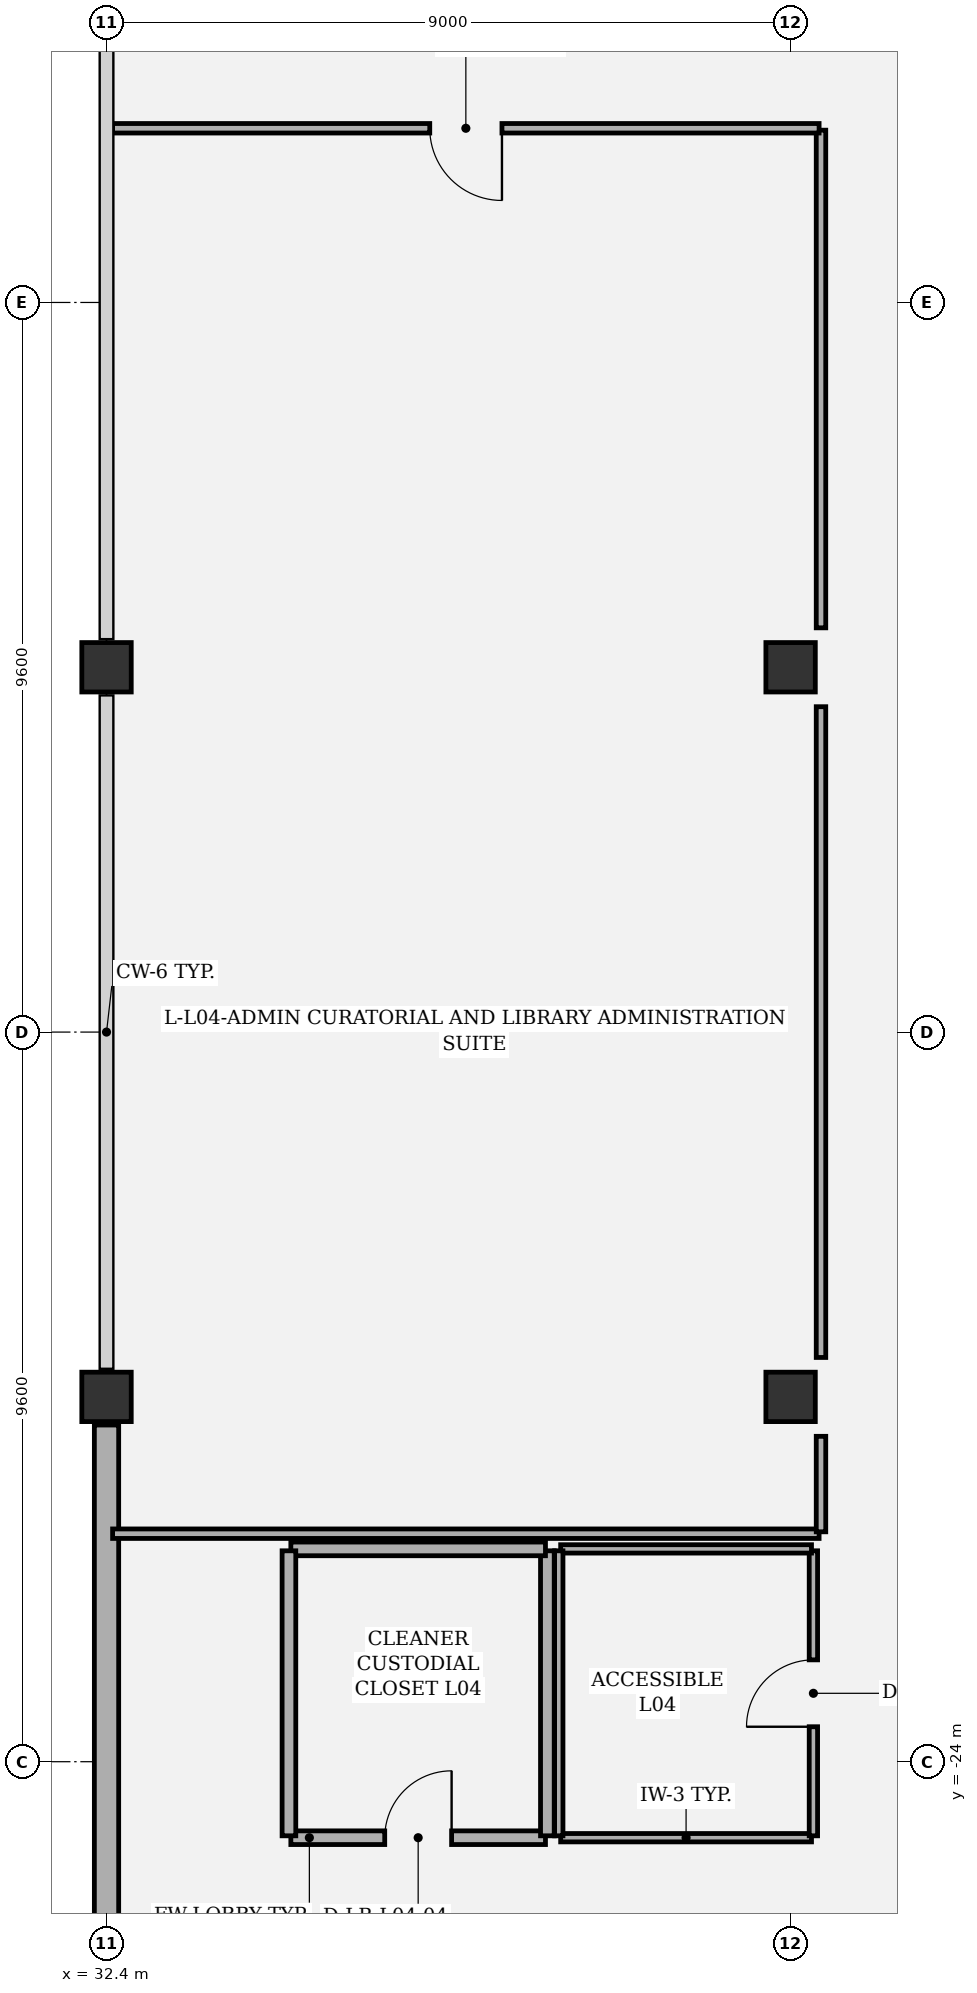
"""IFC4 building model, lengths in metres.
Left out: names, types, materials, properties, quantities, classifications, styles, units other than length and angle.
Written with IfcOpenShell. Run it as: python <this file> out.ifc"""

import sys

from ifc_helpers import new_model, si_unit, direction, frame, frame_2d, origin, origin_2d, place, context, subcontext, project, spatial, rectangle, extrude, element, fill, save


model = new_model("IFC4")
c1 = context("Model", 3, precision=1e-05, world=origin(), true_north=direction((0.0, 1.0)))
c2 = subcontext(c1, "Body", "Model", "MODEL_VIEW")
j1 = project(units=[si_unit("LENGTHUNIT", "METRE"), si_unit("PLANEANGLEUNIT", "RADIAN")], contexts=[c1])
p1 = place(None, origin())
s1 = spatial("IfcSite", under=j1, at=p1, CompositionType="ELEMENT")
p2 = place(p1, origin())
s2 = spatial("IfcBuilding", under=s1, at=p2, CompositionType="ELEMENT")
p3 = place(p2, frame((0.0, 0.0, 22.0)))
s3 = spatial("IfcBuildingStorey", under=s2, at=p3, CompositionType="ELEMENT", Elevation=22.0)
p4 = place(p3, frame((32.4, -19.2, 0.0), z_axis=(0.0, 0.0, 1.0), x_axis=(1.0, 0.0, 0.0)))
e1 = element("IfcColumn", 1, at=p4, inside=s3, PredefinedType="COLUMN", context=c2, shape_type="SweptSolid", body=[
    extrude(rectangle(XDim=0.65, YDim=0.65, at=origin_2d()), origin(), (0.0, 0.0, 1.0), 5.0),
])
p5 = place(p3, frame((32.4, -9.6, 0.0), z_axis=(0.0, 0.0, 1.0), x_axis=(1.0, 0.0, 0.0)))
e2 = element("IfcColumn", 2, at=p5, inside=s3, PredefinedType="COLUMN", context=c2, shape_type="SweptSolid", body=[
    extrude(rectangle(XDim=0.65, YDim=0.65, at=origin_2d()), origin(), (0.0, 0.0, 1.0), 7.094),
])
p6 = place(p3, frame((41.4, -19.2, 0.0), z_axis=(0.0, 0.0, 1.0), x_axis=(1.0, 0.0, 0.0)))
e3 = element("IfcColumn", 3, at=p6, inside=s3, PredefinedType="COLUMN", context=c2, shape_type="SweptSolid", body=[
    extrude(rectangle(XDim=0.65, YDim=0.65, at=origin_2d()), origin(), (0.0, 0.0, 1.0), 5.0),
])
p7 = place(p3, frame((41.4, -9.6, 0.0), z_axis=(0.0, 0.0, 1.0), x_axis=(1.0, 0.0, 0.0)))
e4 = element("IfcColumn", 4, at=p7, inside=s3, PredefinedType="COLUMN", context=c2, shape_type="SweptSolid", body=[
    extrude(rectangle(XDim=0.65, YDim=0.65, at=origin_2d()), origin(), (0.0, 0.0, 1.0), 7.094),
])
p8 = place(p3, frame((32.4, -28.43, 0.0), z_axis=(0.0, 0.0, 1.0), x_axis=(0.0, 1.0, 0.0)))
e5 = element("IfcWall", 5, at=p8, inside=s3, PredefinedType="SOLIDWALL", context=c2, shape_type="SweptSolid", body=[
    extrude(rectangle(XDim=8.86, YDim=0.32, at=frame_2d((4.43, 0.0))), origin(), (0.0, 0.0, 1.0), 4.7),
])
p9 = place(p3, frame((38.375, -25.0, 0.0), z_axis=(0.0, 0.0, 1.0), x_axis=(1.0, 0.0, 0.0)))
e6 = element("IfcWall", 6, at=p9, inside=s3, PredefinedType="PARTITIONING", context=c2, shape_type="SweptSolid", body=[
    extrude(rectangle(XDim=3.3, YDim=0.11, at=frame_2d((1.65, 0.0))), origin(), (0.0, 0.0, 1.0), 4.7),
])
p10 = place(p3, frame((41.7, -24.975, 0.0), z_axis=(0.0, 0.0, 1.0), x_axis=(0.0, 1.0, 0.0)))
e7 = element("IfcWall", 7, at=p10, inside=s3, PredefinedType="PARTITIONING", context=c2, shape_type="SweptSolid", body=[
    extrude(rectangle(XDim=3.75, YDim=0.11, at=frame_2d((1.875, 0.0))), origin(), (0.0, 0.0, 1.0), 4.7),
])
p11 = place(p10, frame((1.435, 0.0, 0.0)))
e8 = element("IfcOpeningElement", 8, at=p11, cuts=e7, PredefinedType="OPENING", context=c2, shape_type="SweptSolid", body=[
    extrude(rectangle(XDim=0.88, YDim=2.1, at=frame_2d((0.44, 1.05))), frame((0.0, 0.065, 0.0), z_axis=(0.0, -1.0, 0.0), x_axis=(1.0, 0.0, 0.0)), (0.0, 0.0, 1.0), 0.13),
])
p12 = place(p3, frame((41.675, -21.2, 0.0), z_axis=(0.0, 0.0, 1.0), x_axis=(-1.0, 0.0, 0.0)))
e9 = element("IfcWall", 9, at=p12, inside=s3, PredefinedType="PARTITIONING", context=c2, shape_type="SweptSolid", body=[
    extrude(rectangle(XDim=3.3, YDim=0.11, at=frame_2d((1.65, 0.0))), origin(), (0.0, 0.0, 1.0), 4.7),
])
p13 = place(p3, frame((38.35, -21.225, 0.0), z_axis=(0.0, 0.0, 1.0), x_axis=(0.0, -1.0, 0.0)))
e10 = element("IfcWall", 10, at=p13, inside=s3, PredefinedType="PARTITIONING", context=c2, shape_type="SweptSolid", body=[
    extrude(rectangle(XDim=3.75, YDim=0.11, at=frame_2d((1.875, 0.0))), origin(), (0.0, 0.0, 1.0), 4.7),
])
p14 = place(p3, frame((34.825, -25.0, 0.0), z_axis=(0.0, 0.0, 1.0), x_axis=(1.0, 0.0, 0.0)))
e11 = element("IfcWall", 11, at=p14, inside=s3, PredefinedType="PARTITIONING", context=c2, shape_type="SweptSolid", body=[
    extrude(rectangle(XDim=3.35, YDim=0.18, at=frame_2d((1.675, 0.0))), origin(), (0.0, 0.0, 1.0), 4.7),
])
p15 = place(p14, frame((1.235, 0.0, 0.0)))
e12 = element("IfcOpeningElement", 12, at=p15, cuts=e11, PredefinedType="OPENING", context=c2, shape_type="SweptSolid", body=[
    extrude(rectangle(XDim=0.88, YDim=2.1, at=frame_2d((0.44, 1.05))), frame((0.0, 0.1, 0.0), z_axis=(0.0, -1.0, 0.0), x_axis=(1.0, 0.0, 0.0)), (0.0, 0.0, 1.0), 0.2),
])
p16 = place(p3, frame((38.2, -24.975, 0.0), z_axis=(0.0, 0.0, 1.0), x_axis=(0.0, 1.0, 0.0)))
e13 = element("IfcWall", 13, at=p16, inside=s3, PredefinedType="PARTITIONING", context=c2, shape_type="SweptSolid", body=[
    extrude(rectangle(XDim=3.75, YDim=0.18, at=frame_2d((1.875, 0.0))), origin(), (0.0, 0.0, 1.0), 4.7),
])
p17 = place(p3, frame((38.175, -21.2, 0.0), z_axis=(0.0, 0.0, 1.0), x_axis=(-1.0, 0.0, 0.0)))
e14 = element("IfcWall", 14, at=p17, inside=s3, PredefinedType="PARTITIONING", context=c2, shape_type="SweptSolid", body=[
    extrude(rectangle(XDim=3.35, YDim=0.18, at=frame_2d((1.675, 0.0))), origin(), (0.0, 0.0, 1.0), 4.7),
])
p18 = place(p3, frame((34.8, -21.225, 0.0), z_axis=(0.0, 0.0, 1.0), x_axis=(0.0, -1.0, 0.0)))
e15 = element("IfcWall", 15, at=p18, inside=s3, PredefinedType="PARTITIONING", context=c2, shape_type="SweptSolid", body=[
    extrude(rectangle(XDim=3.75, YDim=0.18, at=frame_2d((1.875, 0.0))), origin(), (0.0, 0.0, 1.0), 4.7),
])
p19 = place(p3, frame((32.48, -21.0, 0.0), z_axis=(0.0, 0.0, 1.0), x_axis=(1.0, 0.0, 0.0)))
e16 = element("IfcWall", 16, at=p19, inside=s3, PredefinedType="PARTITIONING", context=c2, shape_type="SweptSolid", body=[
    extrude(rectangle(XDim=9.295, YDim=0.125, at=frame_2d((4.647, 0.0))), origin(), (0.0, 0.0, 1.0), 4.7),
])
p20 = place(p3, frame((41.8, -20.975, 0.0), z_axis=(0.0, 0.0, 1.0), x_axis=(0.0, 1.0, 0.0)))
e17 = element("IfcWall", 17, at=p20, inside=s3, PredefinedType="PARTITIONING", context=c2, shape_type="SweptSolid", body=[
    extrude(rectangle(XDim=1.256, YDim=0.125, at=frame_2d((0.628, 0.0))), origin(), (0.0, 0.0, 1.0), 4.7),
])
p21 = place(p3, frame((41.8, -18.681, 0.0), z_axis=(0.0, 0.0, 1.0), x_axis=(0.0, 1.0, 0.0)))
e18 = element("IfcWall", 18, at=p21, inside=s3, PredefinedType="PARTITIONING", context=c2, shape_type="SweptSolid", body=[
    extrude(rectangle(XDim=8.562, YDim=0.125, at=frame_2d((4.281, 0.0))), origin(), (0.0, 0.0, 1.0), 4.7),
])
p22 = place(p3, frame((41.8, -9.081, 0.0), z_axis=(0.0, 0.0, 1.0), x_axis=(0.0, 1.0, 0.0)))
e19 = element("IfcWall", 19, at=p22, inside=s3, PredefinedType="PARTITIONING", context=c2, shape_type="SweptSolid", body=[
    extrude(rectangle(XDim=6.548, YDim=0.125, at=frame_2d((3.274, 0.0))), origin(), (0.0, 0.0, 1.0), 4.7),
])
p23 = place(p3, frame((41.775, -2.508, 0.0), z_axis=(0.0, 0.0, 1.0), x_axis=(-1.0, 0.0, 0.0)))
e20 = element("IfcWall", 20, at=p23, inside=s3, PredefinedType="PARTITIONING", context=c2, shape_type="SweptSolid", body=[
    extrude(rectangle(XDim=9.295, YDim=0.125, at=frame_2d((4.647, 0.0))), origin(), (0.0, 0.0, 1.0), 4.7),
])
p24 = place(p23, frame((4.172, 0.0, 0.0)))
e21 = element("IfcOpeningElement", 21, at=p24, cuts=e20, PredefinedType="OPENING", context=c2, shape_type="SweptSolid", body=[
    extrude(rectangle(XDim=0.95, YDim=2.15, at=frame_2d((0.475, 1.075))), frame((0.0, 0.073, 0.0), z_axis=(0.0, -1.0, 0.0), x_axis=(1.0, 0.0, 0.0)), (0.0, 0.0, 1.0), 0.145),
])
p25 = place(p11, origin())
e22 = element("IfcDoor", 22, at=p25, inside=s3, OperationType="SINGLE_SWING_LEFT", PredefinedType="DOOR", context=c2, shape_type="SweptSolid", body=[
    extrude(rectangle(XDim=0.88, YDim=2.1, at=frame_2d((0.44, 1.05))), frame((0.0, 0.025, 0.0), z_axis=(0.0, -1.0, 0.0), x_axis=(1.0, 0.0, 0.0)), (0.0, 0.0, 1.0), 0.05),
])
fill(e8, e22)
p26 = place(p15, origin())
e23 = element("IfcDoor", 23, at=p26, inside=s3, OperationType="SINGLE_SWING_RIGHT", PredefinedType="DOOR", context=c2, shape_type="SweptSolid", body=[
    extrude(rectangle(XDim=0.88, YDim=2.1, at=frame_2d((0.44, 1.05))), frame((0.0, 0.025, 0.0), z_axis=(0.0, -1.0, 0.0), x_axis=(1.0, 0.0, 0.0)), (0.0, 0.0, 1.0), 0.05),
])
fill(e12, e23)
p27 = place(p24, origin())
e24 = element("IfcDoor", 24, at=p27, inside=s3, OperationType="SINGLE_SWING_LEFT", PredefinedType="DOOR", context=c2, shape_type="SweptSolid", body=[
    extrude(rectangle(XDim=0.95, YDim=2.15, at=frame_2d((0.475, 1.075))), frame((0.0, 0.025, 0.0), z_axis=(0.0, -1.0, 0.0), x_axis=(1.0, 0.0, 0.0)), (0.0, 0.0, 1.0), 0.05),
])
fill(e21, e24)
save(model, sys.argv[1])
